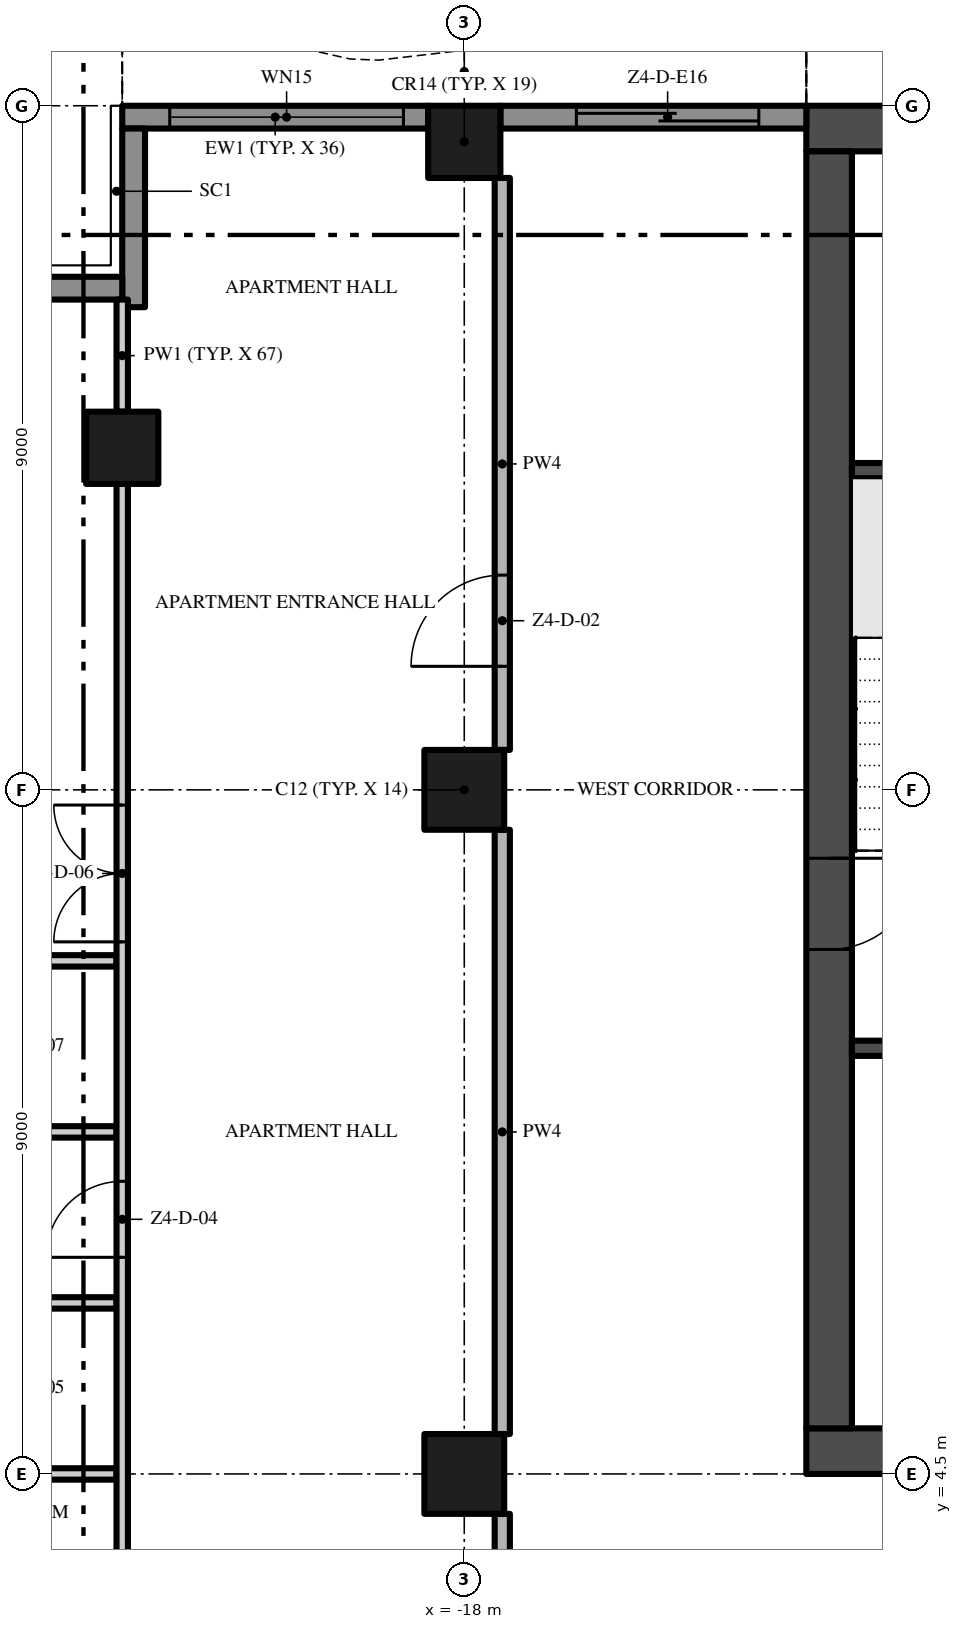
"""IFC4 building model, lengths in metres.
Left out: names, types, materials, properties, quantities, classifications, styles, units other than length and angle.
Written with IfcOpenShell. Run it as: python <this file> out.ifc"""

import sys

from ifc_helpers import new_model, si_unit, direction, frame, frame_2d, origin, origin_2d, place, context, subcontext, project, spatial, polyline, rectangle, outline, extrude, element, fill, save


model = new_model("IFC4")
c1 = context("Model", 3, precision=1e-05, world=origin(), true_north=direction((0.0, 1.0)))
c2 = subcontext(c1, "Body", "Model", "MODEL_VIEW")
j1 = project(units=[si_unit("LENGTHUNIT", "METRE"), si_unit("PLANEANGLEUNIT", "RADIAN")], contexts=[c1])
p1 = place(None, origin())
s1 = spatial("IfcSite", under=j1, at=p1, CompositionType="ELEMENT")
p2 = place(p1, origin())
s2 = spatial("IfcBuilding", under=s1, at=p2, CompositionType="ELEMENT")
p3 = place(p2, frame((0.0, 0.0, 222.4)))
s3 = spatial("IfcBuildingStorey", under=s2, at=p3, CompositionType="ELEMENT", Elevation=222.4)
p4 = place(p3, frame((-13.5, 4.8, -0.3), z_axis=(0.0, 0.0, 1.0), x_axis=(1.0, 0.0, 0.0)))
e1 = element("IfcWall", 1, at=p4, inside=s3, PredefinedType="SHEAR", context=c2, shape_type="SweptSolid", body=[
    extrude(rectangle(XDim=27.0, YDim=0.6, at=frame_2d((13.5, 0.0))), origin(), (0.0, 0.0, 1.0), 3.8),
])
p5 = place(p4, frame((12.0, 0.0, 0.3)))
e2 = element("IfcOpeningElement", 2, at=p5, cuts=e1, PredefinedType="OPENING", context=c2, shape_type="SweptSolid", body=[
    extrude(rectangle(XDim=3.0, YDim=2.4, at=frame_2d((1.5, 1.2))), frame((0.0, 0.31, 0.0), z_axis=(0.0, -1.0, 0.0), x_axis=(1.0, 0.0, 0.0)), (0.0, 0.0, 1.0), 0.62),
])
p6 = place(p4, frame((4.9, 0.0, 0.3)))
e3 = element("IfcOpeningElement", 3, at=p6, cuts=e1, PredefinedType="OPENING", context=c2, shape_type="SweptSolid", body=[
    extrude(rectangle(XDim=1.2, YDim=2.2, at=frame_2d((0.6, 1.1))), frame((0.0, 0.31, 0.0), z_axis=(0.0, -1.0, 0.0), x_axis=(1.0, 0.0, 0.0)), (0.0, 0.0, 1.0), 0.62),
])
p7 = place(p4, frame((20.75, 0.0, 0.3)))
e4 = element("IfcOpeningElement", 4, at=p7, cuts=e1, PredefinedType="OPENING", context=c2, shape_type="SweptSolid", body=[
    extrude(rectangle(XDim=1.5, YDim=2.2, at=frame_2d((0.75, 1.1))), frame((0.0, 0.31, 0.0), z_axis=(0.0, -1.0, 0.0), x_axis=(1.0, 0.0, 0.0)), (0.0, 0.0, 1.0), 0.62),
])
p8 = place(p4, frame((17.4, 0.0, 0.3)))
e5 = element("IfcOpeningElement", 5, at=p8, cuts=e1, PredefinedType="OPENING", context=c2, shape_type="SweptSolid", body=[
    extrude(rectangle(XDim=1.2, YDim=2.2, at=frame_2d((0.6, 1.1))), frame((0.0, 0.31, 0.0), z_axis=(0.0, -1.0, 0.0), x_axis=(1.0, 0.0, 0.0)), (0.0, 0.0, 1.0), 0.62),
])
p9 = place(p3, frame((13.5, 22.2, -0.3), z_axis=(0.0, 0.0, 1.0), x_axis=(-1.0, 0.0, 0.0)))
e6 = element("IfcWall", 6, at=p9, inside=s3, PredefinedType="SHEAR", context=c2, shape_type="SweptSolid", body=[
    extrude(rectangle(XDim=27.0, YDim=0.6, at=frame_2d((13.5, 0.0))), origin(), (0.0, 0.0, 1.0), 3.8),
])
p10 = place(p3, frame((-13.2, 21.9, -0.3), z_axis=(0.0, 0.0, 1.0), x_axis=(0.0, -1.0, 0.0)))
e7 = element("IfcWall", 7, at=p10, inside=s3, PredefinedType="SHEAR", context=c2, shape_type="SweptSolid", body=[
    extrude(rectangle(XDim=16.8, YDim=0.6, at=frame_2d((8.4, 0.0))), origin(), (0.0, 0.0, 1.0), 3.8),
])
p11 = place(p10, frame((9.3, 0.0, 0.3)))
e8 = element("IfcOpeningElement", 8, at=p11, cuts=e7, PredefinedType="OPENING", context=c2, shape_type="SweptSolid", body=[
    extrude(rectangle(XDim=1.2, YDim=2.2, at=frame_2d((0.6, 1.1))), frame((0.0, 0.31, 0.0), z_axis=(0.0, -1.0, 0.0), x_axis=(1.0, 0.0, 0.0)), (0.0, 0.0, 1.0), 0.62),
])
p12 = place(p3, frame((-18.0, 13.5, 0.0), z_axis=(0.0, 0.0, 1.0), x_axis=(1.0, 0.0, 0.0)))
e9 = element("IfcColumn", 9, at=p12, inside=s3, PredefinedType="COLUMN", context=c2, shape_type="SweptSolid", body=[
    extrude(rectangle(XDim=1.05, YDim=1.05, at=origin_2d()), origin(), (0.0, 0.0, 1.0), 3.5),
])
p13 = place(p3, frame((-18.0, 22.025, 0.0), z_axis=(0.0, 0.0, 1.0), x_axis=(1.0, 0.0, 0.0)))
e10 = element("IfcColumn", 10, at=p13, inside=s3, PredefinedType="COLUMN", context=c2, shape_type="SweptSolid", body=[
    extrude(rectangle(XDim=0.95, YDim=0.95, at=origin_2d()), origin(), (0.0, 0.0, 1.0), 3.5),
])
p14 = place(p3, frame((-18.0, 4.5, 0.0), z_axis=(0.0, 0.0, 1.0), x_axis=(1.0, 0.0, 0.0)))
e11 = element("IfcColumn", 11, at=p14, inside=s3, PredefinedType="COLUMN", context=c2, shape_type="SweptSolid", body=[
    extrude(rectangle(XDim=1.05, YDim=1.05, at=origin_2d()), origin(), (0.0, 0.0, 1.0), 3.5),
])
p15 = place(p3, frame((-22.5, 18.0, 0.0), z_axis=(0.0, 0.0, 1.0), x_axis=(1.0, 0.0, 0.0)))
e12 = element("IfcColumn", 12, at=p15, inside=s3, PredefinedType="COLUMN", context=c2, shape_type="SweptSolid", body=[
    extrude(rectangle(XDim=0.95, YDim=0.95, at=origin_2d()), origin(), (0.0, 0.0, 1.0), 3.5),
])
p16 = place(p3, frame((-17.525, 22.35, 0.0), z_axis=(0.0, 0.0, 1.0), x_axis=(1.0, 0.0, 0.0)))
e13 = element("IfcWall", 13, at=p16, inside=s3, PredefinedType="SOLIDWALL", context=c2, shape_type="SweptSolid", body=[
    extrude(rectangle(XDim=4.025, YDim=0.3, at=frame_2d((2.013, 0.0))), origin(), (0.0, 0.0, 1.0), 3.5),
])
p17 = place(p16, frame((1.0, 0.0, 0.0)))
e14 = element("IfcOpeningElement", 14, at=p17, cuts=e13, PredefinedType="OPENING", context=c2, shape_type="SweptSolid", body=[
    extrude(rectangle(XDim=2.4, YDim=2.4, at=frame_2d((1.2, 1.2))), frame((0.0, 0.16, 0.0), z_axis=(0.0, -1.0, 0.0), x_axis=(1.0, 0.0, 0.0)), (0.0, 0.0, 1.0), 0.32),
])
p18 = place(p3, frame((-22.5, 22.35, 0.0), z_axis=(0.0, 0.0, 1.0), x_axis=(1.0, 0.0, 0.0)))
e15 = element("IfcWall", 15, at=p18, inside=s3, PredefinedType="SOLIDWALL", context=c2, shape_type="SweptSolid", body=[
    extrude(rectangle(XDim=4.025, YDim=0.3, at=frame_2d((2.013, 0.0))), origin(), (0.0, 0.0, 1.0), 3.5),
])
p19 = place(p18, frame((0.625, 0.0, 0.45)))
e16 = element("IfcOpeningElement", 16, at=p19, cuts=e15, PredefinedType="OPENING", context=c2, shape_type="SweptSolid", body=[
    extrude(rectangle(XDim=3.075, YDim=2.65, at=frame_2d((1.538, 1.325))), frame((0.0, 0.16, 0.0), z_axis=(0.0, -1.0, 0.0), x_axis=(1.0, 0.0, 0.0)), (0.0, 0.0, 1.0), 0.32),
])
p20 = place(p3, frame((-22.35, 19.85, 0.0), z_axis=(0.0, 0.0, 1.0), x_axis=(0.0, 1.0, 0.0)))
e17 = element("IfcWall", 17, at=p20, inside=s3, PredefinedType="SOLIDWALL", context=c2, shape_type="SweptSolid", body=[
    extrude(rectangle(XDim=2.35, YDim=0.3, at=frame_2d((1.175, 0.0))), origin(), (0.0, 0.0, 1.0), 3.5),
])
p21 = place(p3, frame((-24.75, 20.1, 0.0), z_axis=(0.0, 0.0, 1.0), x_axis=(1.0, 0.0, 0.0)))
e18 = element("IfcWall", 18, at=p21, inside=s3, PredefinedType="SOLIDWALL", context=c2, shape_type="SweptSolid", body=[
    extrude(rectangle(XDim=2.25, YDim=0.3, at=frame_2d((1.125, 0.0))), origin(), (0.0, 0.0, 1.0), 3.5),
])
p22 = place(p3, origin())
e19 = element("IfcWall", 19, at=p22, inside=s3, PredefinedType="USERDEFINED", context=c2, shape_type="SweptSolid", body=[
    extrude(outline(polyline([(-13.5, 25.149), (-15.0, 24.488), (-16.5, 23.755), (-18.0, 23.231), (-19.125, 23.1), (-19.5, 23.115), (-21.0, 23.451), (-22.5, 24.112), (-22.601, 23.883), (-21.079, 23.213), (-19.533, 22.866), (-19.115, 22.849), (-17.944, 22.986), (-16.404, 23.524), (-14.895, 24.261), (-13.399, 24.92), (-13.5, 25.149)])), origin(), (0.0, 0.0, 1.0), 0.9),
])
for number, where, z_axis, x_axis in (
    (20, (-12.9, 10.1, 0.0), (0.0, 0.0, 1.0), (1.0, 0.0, 0.0)),
    (21, (-12.9, 17.7, 0.0), (0.0, 0.0, 1.0), (1.0, 0.0, 0.0)),
):
    element("IfcWall", number, at=place(p3, frame(where, z_axis=z_axis, x_axis=x_axis)), inside=s3, PredefinedType="SHEAR", context=c2, shape_type="SweptSolid", body=[
        extrude(rectangle(XDim=3.25, YDim=0.2, at=frame_2d((1.625, 0.0))), origin(), (0.0, 0.0, 1.0), 3.5),
    ])
p23 = place(p3, frame((-26.05, 4.5, 0.0), z_axis=(0.0, 0.0, 1.0), x_axis=(1.0, 0.0, 0.0)))
e22 = element("IfcWall", 22, at=p23, inside=s3, PredefinedType="PARTITIONING", context=c2, shape_type="SweptSolid", body=[
    extrude(rectangle(XDim=3.475, YDim=0.15, at=frame_2d((1.738, 0.0))), origin(), (0.0, 0.0, 1.0), 3.5),
])
p24 = place(p3, frame((-24.45, 6.75, 0.0), z_axis=(0.0, 0.0, 1.0), x_axis=(1.0, 0.0, 0.0)))
e23 = element("IfcWall", 23, at=p24, inside=s3, PredefinedType="PARTITIONING", context=c2, shape_type="SweptSolid", body=[
    extrude(rectangle(XDim=1.875, YDim=0.15, at=frame_2d((0.938, 0.0))), origin(), (0.0, 0.0, 1.0), 3.5),
])
p25 = place(p3, frame((-26.7, 9.0, 0.0), z_axis=(0.0, 0.0, 1.0), x_axis=(1.0, 0.0, 0.0)))
e24 = element("IfcWall", 24, at=p25, inside=s3, PredefinedType="PARTITIONING", context=c2, shape_type="SweptSolid", body=[
    extrude(rectangle(XDim=4.125, YDim=0.15, at=frame_2d((2.062, 0.0))), origin(), (0.0, 0.0, 1.0), 3.5),
])
p26 = place(p3, frame((-24.45, 11.25, 0.0), z_axis=(0.0, 0.0, 1.0), x_axis=(1.0, 0.0, 0.0)))
e25 = element("IfcWall", 25, at=p26, inside=s3, PredefinedType="PARTITIONING", context=c2, shape_type="SweptSolid", body=[
    extrude(rectangle(XDim=1.875, YDim=0.15, at=frame_2d((0.938, 0.0))), origin(), (0.0, 0.0, 1.0), 3.5),
])
p27 = place(p3, frame((-22.5, 0.1, 0.0), z_axis=(0.0, 0.0, 1.0), x_axis=(0.0, 1.0, 0.0)))
e26 = element("IfcWall", 26, at=p27, inside=s3, PredefinedType="PARTITIONING", context=c2, shape_type="SweptSolid", body=[
    extrude(rectangle(XDim=17.425, YDim=0.15, at=frame_2d((8.713, 0.0))), origin(), (0.0, 0.0, 1.0), 3.5),
])
p28 = place(p27, frame((1.65, 0.0, 0.0)))
e27 = element("IfcOpeningElement", 27, at=p28, cuts=e26, PredefinedType="OPENING", context=c2, shape_type="SweptSolid", body=[
    extrude(rectangle(XDim=1.0, YDim=2.4, at=frame_2d((0.5, 1.2))), frame((0.0, 0.085, 0.0), z_axis=(0.0, -1.0, 0.0), x_axis=(1.0, 0.0, 0.0)), (0.0, 0.0, 1.0), 0.17),
])
p29 = place(p27, frame((7.25, 0.0, 0.0)))
e28 = element("IfcOpeningElement", 28, at=p29, cuts=e26, PredefinedType="OPENING", context=c2, shape_type="SweptSolid", body=[
    extrude(rectangle(XDim=1.0, YDim=2.4, at=frame_2d((0.5, 1.2))), frame((0.0, 0.085, 0.0), z_axis=(0.0, -1.0, 0.0), x_axis=(1.0, 0.0, 0.0)), (0.0, 0.0, 1.0), 0.17),
])
p30 = place(p27, frame((11.4, 0.0, 0.0)))
e29 = element("IfcOpeningElement", 29, at=p30, cuts=e26, PredefinedType="OPENING", context=c2, shape_type="SweptSolid", body=[
    extrude(rectangle(XDim=1.8, YDim=2.4, at=frame_2d((0.9, 1.2))), frame((0.0, 0.085, 0.0), z_axis=(0.0, -1.0, 0.0), x_axis=(1.0, 0.0, 0.0)), (0.0, 0.0, 1.0), 0.17),
])
p31 = place(p3, frame((-22.5, 18.475, 0.0), z_axis=(0.0, 0.0, 1.0), x_axis=(0.0, 1.0, 0.0)))
e30 = element("IfcWall", 30, at=p31, inside=s3, PredefinedType="PARTITIONING", context=c2, shape_type="SweptSolid", body=[
    extrude(rectangle(XDim=1.475, YDim=0.15, at=frame_2d((0.738, 0.0))), origin(), (0.0, 0.0, 1.0), 3.5),
])
p32 = place(p3, frame((-17.5, -0.2, 0.0), z_axis=(0.0, 0.0, 1.0), x_axis=(0.0, 1.0, 0.0)))
e31 = element("IfcWall", 31, at=p32, inside=s3, PredefinedType="PARTITIONING", context=c2, shape_type="SweptSolid", body=[
    extrude(rectangle(XDim=4.175, YDim=0.2, at=frame_2d((2.087, 0.0))), origin(), (0.0, 0.0, 1.0), 3.5),
])
p33 = place(p3, frame((-17.5, 5.025, 0.0), z_axis=(0.0, 0.0, 1.0), x_axis=(0.0, 1.0, 0.0)))
e32 = element("IfcWall", 32, at=p33, inside=s3, PredefinedType="PARTITIONING", context=c2, shape_type="SweptSolid", body=[
    extrude(rectangle(XDim=7.95, YDim=0.2, at=frame_2d((3.975, 0.0))), origin(), (0.0, 0.0, 1.0), 3.5),
])
p34 = place(p3, frame((-17.5, 14.025, 0.0), z_axis=(0.0, 0.0, 1.0), x_axis=(0.0, 1.0, 0.0)))
e33 = element("IfcWall", 33, at=p34, inside=s3, PredefinedType="PARTITIONING", context=c2, shape_type="SweptSolid", body=[
    extrude(rectangle(XDim=7.525, YDim=0.2, at=frame_2d((3.763, 0.0))), origin(), (0.0, 0.0, 1.0), 3.5),
])
p35 = place(p34, frame((1.1, 0.0, 0.0)))
e34 = element("IfcOpeningElement", 34, at=p35, cuts=e33, PredefinedType="OPENING", context=c2, shape_type="SweptSolid", body=[
    extrude(rectangle(XDim=1.2, YDim=2.4, at=frame_2d((0.6, 1.2))), frame((0.0, 0.11, 0.0), z_axis=(0.0, -1.0, 0.0), x_axis=(1.0, 0.0, 0.0)), (0.0, 0.0, 1.0), 0.22),
])
p36 = place(p17, origin())
e35 = element("IfcDoor", 35, at=p36, inside=s3, OperationType="SINGLE_SWING_LEFT", PredefinedType="DOOR", context=c2, shape_type="SweptSolid", body=[
    extrude(rectangle(XDim=2.4, YDim=2.4, at=frame_2d((1.2, 1.2))), frame((0.0, 0.025, 0.0), z_axis=(0.0, -1.0, 0.0), x_axis=(1.0, 0.0, 0.0)), (0.0, 0.0, 1.0), 0.05),
])
fill(e14, e35)
p37 = place(p19, origin())
e36 = element("IfcWindow", 36, at=p37, inside=s3, PartitioningType="SINGLE_PANEL", PredefinedType="WINDOW", context=c2, shape_type="SweptSolid", body=[
    extrude(rectangle(XDim=3.075, YDim=2.65, at=frame_2d((1.538, 1.325))), frame((0.0, 0.03, 0.0), z_axis=(0.0, -1.0, 0.0), x_axis=(1.0, 0.0, 0.0)), (0.0, 0.0, 1.0), 0.06),
])
fill(e16, e36)
p38 = place(p11, frame((1.2, 0.0, 0.0), z_axis=(0.0, 0.0, 1.0), x_axis=(-1.0, 0.0, 0.0)))
e37 = element("IfcDoor", 37, at=p38, inside=s3, OperationType="SINGLE_SWING_RIGHT", PredefinedType="DOOR", context=c2, shape_type="SweptSolid", body=[
    extrude(rectangle(XDim=1.2, YDim=2.2, at=frame_2d((0.6, 1.1))), frame((0.0, 0.025, 0.0), z_axis=(0.0, -1.0, 0.0), x_axis=(1.0, 0.0, 0.0)), (0.0, 0.0, 1.0), 0.05),
])
fill(e8, e37)
p39 = place(p35, origin())
e38 = element("IfcDoor", 38, at=p39, inside=s3, OperationType="SINGLE_SWING_LEFT", PredefinedType="DOOR", context=c2, shape_type="SweptSolid", body=[
    extrude(rectangle(XDim=1.2, YDim=2.4, at=frame_2d((0.6, 1.2))), frame((0.0, 0.025, 0.0), z_axis=(0.0, -1.0, 0.0), x_axis=(1.0, 0.0, 0.0)), (0.0, 0.0, 1.0), 0.05),
])
fill(e34, e38)
p40 = place(p29, origin())
e39 = element("IfcDoor", 39, at=p40, inside=s3, OperationType="SINGLE_SWING_LEFT", PredefinedType="DOOR", context=c2, shape_type="SweptSolid", body=[
    extrude(rectangle(XDim=1.0, YDim=2.4, at=frame_2d((0.5, 1.2))), frame((0.0, 0.025, 0.0), z_axis=(0.0, -1.0, 0.0), x_axis=(1.0, 0.0, 0.0)), (0.0, 0.0, 1.0), 0.05),
])
fill(e28, e39)
p41 = place(p30, origin())
e40 = element("IfcDoor", 40, at=p41, inside=s3, OperationType="DOUBLE_DOOR_SINGLE_SWING", PredefinedType="DOOR", context=c2, shape_type="SweptSolid", body=[
    extrude(rectangle(XDim=1.8, YDim=2.4, at=frame_2d((0.9, 1.2))), frame((0.0, 0.025, 0.0), z_axis=(0.0, -1.0, 0.0), x_axis=(1.0, 0.0, 0.0)), (0.0, 0.0, 1.0), 0.05),
])
fill(e29, e40)
save(model, sys.argv[1])
